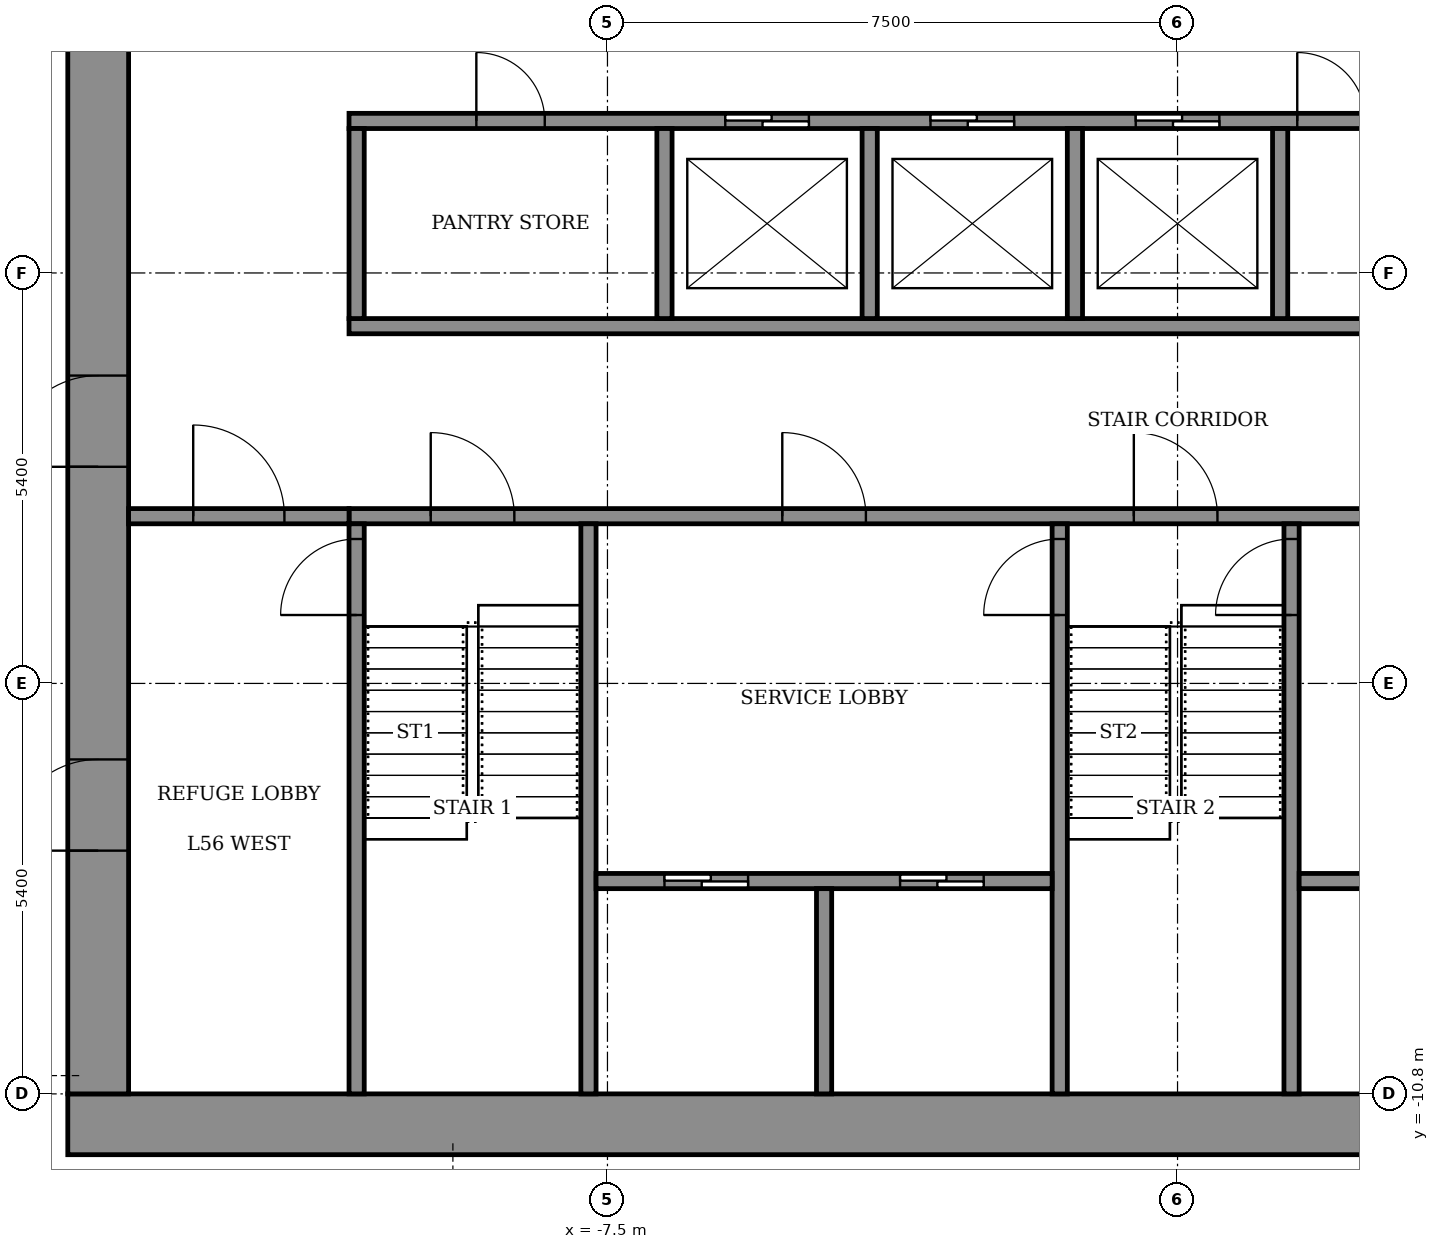
"""IFC4 building model, lengths in metres.
Left out: names, types, materials, properties, quantities, classifications, styles, units other than length and angle.
Written with IfcOpenShell. Run it as: python <this file> out.ifc"""

import sys

from ifc_helpers import new_model, si_unit, direction, frame, frame_2d, origin, place, context, subcontext, project, spatial, rectangle, extrude, element, fill, save


model = new_model("IFC4")
c1 = context("Model", 3, precision=1e-05, world=origin(), true_north=direction((0.0, 1.0)))
c2 = subcontext(c1, "Body", "Model", "MODEL_VIEW")
j1 = project(units=[si_unit("LENGTHUNIT", "METRE"), si_unit("PLANEANGLEUNIT", "RADIAN")], contexts=[c1])
p1 = place(None, origin())
s1 = spatial("IfcSite", under=j1, at=p1, CompositionType="ELEMENT")
p2 = place(p1, origin())
s2 = spatial("IfcBuilding", under=s1, at=p2, CompositionType="ELEMENT")
p3 = place(p2, frame((0.0, 0.0, 219.5)))
s3 = spatial("IfcBuildingStorey", under=s2, at=p3, CompositionType="ELEMENT", Elevation=219.5)
p4 = place(p3, frame((-14.6, -11.2, 0.0), z_axis=(0.0, 0.0, 1.0), x_axis=(1.0, 0.0, 0.0)))
e1 = element("IfcWall", 1, at=p4, inside=s3, PredefinedType="SHEAR", context=c2, shape_type="SweptSolid", body=[
    extrude(rectangle(XDim=29.2, YDim=0.8, at=frame_2d((14.6, 0.0))), origin(), (0.0, 0.0, 1.0), 7.0),
])
p5 = place(p3, frame((-14.2, -10.8, 0.0), z_axis=(0.0, 0.0, 1.0), x_axis=(0.0, 1.0, 0.0)))
e2 = element("IfcWall", 2, at=p5, inside=s3, PredefinedType="SHEAR", context=c2, shape_type="SweptSolid", body=[
    extrude(rectangle(XDim=21.6, YDim=0.8, at=frame_2d((10.8, 0.0))), origin(), (0.0, 0.0, 1.0), 7.0),
])
p6 = place(p5, frame((8.25, 0.0, 0.0)))
e3 = element("IfcOpeningElement", 3, at=p6, cuts=e2, PredefinedType="OPENING", context=c2, shape_type="SweptSolid", body=[
    extrude(rectangle(XDim=1.2, YDim=2.1, at=frame_2d((0.6, 1.05))), frame((0.0, 0.41, 0.0), z_axis=(0.0, -1.0, 0.0), x_axis=(1.0, 0.0, 0.0)), (0.0, 0.0, 1.0), 0.82),
])
p7 = place(p5, frame((15.25, 0.0, 0.0)))
e4 = element("IfcOpeningElement", 4, at=p7, cuts=e2, PredefinedType="OPENING", context=c2, shape_type="SweptSolid", body=[
    extrude(rectangle(XDim=1.2, YDim=2.1, at=frame_2d((0.6, 1.05))), frame((0.0, 0.41, 0.0), z_axis=(0.0, -1.0, 0.0), x_axis=(1.0, 0.0, 0.0)), (0.0, 0.0, 1.0), 0.82),
])
p8 = place(p5, frame((3.2, 0.0, 0.0)))
e5 = element("IfcOpeningElement", 5, at=p8, cuts=e2, PredefinedType="OPENING", context=c2, shape_type="SweptSolid", body=[
    extrude(rectangle(XDim=1.2, YDim=2.1, at=frame_2d((0.6, 1.05))), frame((0.0, 0.41, 0.0), z_axis=(0.0, -1.0, 0.0), x_axis=(1.0, 0.0, 0.0)), (0.0, 0.0, 1.0), 0.82),
])
p9 = place(p3, frame((-10.9, -3.2, 0.0), z_axis=(0.0, 0.0, 1.0), x_axis=(1.0, 0.0, 0.0)))
e6 = element("IfcWall", 6, at=p9, inside=s3, PredefinedType="SHEAR", context=c2, shape_type="SweptSolid", body=[
    extrude(rectangle(XDim=21.8, YDim=0.2, at=frame_2d((10.9, 0.0))), origin(), (0.0, 0.0, 1.0), 6.45),
])
p10 = place(p9, frame((1.075, 0.0, 0.0)))
e7 = element("IfcOpeningElement", 7, at=p10, cuts=e6, PredefinedType="OPENING", context=c2, shape_type="SweptSolid", body=[
    extrude(rectangle(XDim=1.1, YDim=2.1, at=frame_2d((0.55, 1.05))), frame((0.0, 0.11, 0.0), z_axis=(0.0, -1.0, 0.0), x_axis=(1.0, 0.0, 0.0)), (0.0, 0.0, 1.0), 0.22),
])
p11 = place(p9, frame((10.325, 0.0, 0.0)))
e8 = element("IfcOpeningElement", 8, at=p11, cuts=e6, PredefinedType="OPENING", context=c2, shape_type="SweptSolid", body=[
    extrude(rectangle(XDim=1.1, YDim=2.1, at=frame_2d((0.55, 1.05))), frame((0.0, 0.11, 0.0), z_axis=(0.0, -1.0, 0.0), x_axis=(1.0, 0.0, 0.0)), (0.0, 0.0, 1.0), 0.22),
])
p12 = place(p9, frame((19.625, 0.0, 0.0)))
e9 = element("IfcOpeningElement", 9, at=p12, cuts=e6, PredefinedType="OPENING", context=c2, shape_type="SweptSolid", body=[
    extrude(rectangle(XDim=1.1, YDim=2.1, at=frame_2d((0.55, 1.05))), frame((0.0, 0.11, 0.0), z_axis=(0.0, -1.0, 0.0), x_axis=(1.0, 0.0, 0.0)), (0.0, 0.0, 1.0), 0.22),
])
p13 = place(p9, frame((5.7, 0.0, 0.0)))
e10 = element("IfcOpeningElement", 10, at=p13, cuts=e6, PredefinedType="OPENING", context=c2, shape_type="SweptSolid", body=[
    extrude(rectangle(XDim=1.1, YDim=2.1, at=frame_2d((0.55, 1.05))), frame((0.0, 0.11, 0.0), z_axis=(0.0, -1.0, 0.0), x_axis=(1.0, 0.0, 0.0)), (0.0, 0.0, 1.0), 0.22),
])
p14 = place(p9, frame((14.975, 0.0, 0.0)))
e11 = element("IfcOpeningElement", 11, at=p14, cuts=e6, PredefinedType="OPENING", context=c2, shape_type="SweptSolid", body=[
    extrude(rectangle(XDim=1.1, YDim=2.1, at=frame_2d((0.55, 1.05))), frame((0.0, 0.11, 0.0), z_axis=(0.0, -1.0, 0.0), x_axis=(1.0, 0.0, 0.0)), (0.0, 0.0, 1.0), 0.22),
])
p15 = place(p3, frame((-10.9, -0.7, 0.0), z_axis=(0.0, 0.0, 1.0), x_axis=(1.0, 0.0, 0.0)))
e12 = element("IfcWall", 12, at=p15, inside=s3, PredefinedType="SHEAR", context=c2, shape_type="SweptSolid", body=[
    extrude(rectangle(XDim=21.8, YDim=0.2, at=frame_2d((10.9, 0.0))), origin(), (0.0, 0.0, 1.0), 6.45),
])
p16 = place(p3, frame((-10.9, 2.0, 0.0), z_axis=(0.0, 0.0, 1.0), x_axis=(1.0, 0.0, 0.0)))
e13 = element("IfcWall", 13, at=p16, inside=s3, PredefinedType="SHEAR", context=c2, shape_type="SweptSolid", body=[
    extrude(rectangle(XDim=21.8, YDim=0.2, at=frame_2d((10.9, 0.0))), origin(), (0.0, 0.0, 1.0), 6.45),
])
p17 = place(p16, frame((4.95, 0.0, 0.0)))
e14 = element("IfcOpeningElement", 14, at=p17, cuts=e13, PredefinedType="OPENING", context=c2, shape_type="SweptSolid", body=[
    extrude(rectangle(XDim=1.1, YDim=2.1, at=frame_2d((0.55, 1.05))), frame((0.0, 0.11, 0.0), z_axis=(0.0, -1.0, 0.0), x_axis=(1.0, 0.0, 0.0)), (0.0, 0.0, 1.0), 0.22),
])
p18 = place(p16, frame((7.65, 0.0, 0.0)))
e15 = element("IfcOpeningElement", 15, at=p18, cuts=e13, PredefinedType="OPENING", context=c2, shape_type="SweptSolid", body=[
    extrude(rectangle(XDim=1.1, YDim=2.1, at=frame_2d((0.55, 1.05))), frame((0.0, 0.11, 0.0), z_axis=(0.0, -1.0, 0.0), x_axis=(1.0, 0.0, 0.0)), (0.0, 0.0, 1.0), 0.22),
])
p19 = place(p16, frame((10.35, 0.0, 0.0)))
e16 = element("IfcOpeningElement", 16, at=p19, cuts=e13, PredefinedType="OPENING", context=c2, shape_type="SweptSolid", body=[
    extrude(rectangle(XDim=1.1, YDim=2.1, at=frame_2d((0.55, 1.05))), frame((0.0, 0.11, 0.0), z_axis=(0.0, -1.0, 0.0), x_axis=(1.0, 0.0, 0.0)), (0.0, 0.0, 1.0), 0.22),
])
p20 = place(p16, frame((14.4, 0.0, 0.0)))
e17 = element("IfcOpeningElement", 17, at=p20, cuts=e13, PredefinedType="OPENING", context=c2, shape_type="SweptSolid", body=[
    extrude(rectangle(XDim=1.1, YDim=2.1, at=frame_2d((0.55, 1.05))), frame((0.0, 0.11, 0.0), z_axis=(0.0, -1.0, 0.0), x_axis=(1.0, 0.0, 0.0)), (0.0, 0.0, 1.0), 0.22),
])
p21 = place(p16, frame((17.1, 0.0, 0.0)))
e18 = element("IfcOpeningElement", 18, at=p21, cuts=e13, PredefinedType="OPENING", context=c2, shape_type="SweptSolid", body=[
    extrude(rectangle(XDim=1.1, YDim=2.1, at=frame_2d((0.55, 1.05))), frame((0.0, 0.11, 0.0), z_axis=(0.0, -1.0, 0.0), x_axis=(1.0, 0.0, 0.0)), (0.0, 0.0, 1.0), 0.22),
])
p22 = place(p16, frame((19.8, 0.0, 0.0)))
e19 = element("IfcOpeningElement", 19, at=p22, cuts=e13, PredefinedType="OPENING", context=c2, shape_type="SweptSolid", body=[
    extrude(rectangle(XDim=1.1, YDim=2.1, at=frame_2d((0.55, 1.05))), frame((0.0, 0.11, 0.0), z_axis=(0.0, -1.0, 0.0), x_axis=(1.0, 0.0, 0.0)), (0.0, 0.0, 1.0), 0.22),
])
p23 = place(p16, frame((1.675, 0.0, 0.0)))
e20 = element("IfcOpeningElement", 20, at=p23, cuts=e13, PredefinedType="OPENING", context=c2, shape_type="SweptSolid", body=[
    extrude(rectangle(XDim=0.9, YDim=2.1, at=frame_2d((0.45, 1.05))), frame((0.0, 0.11, 0.0), z_axis=(0.0, -1.0, 0.0), x_axis=(1.0, 0.0, 0.0)), (0.0, 0.0, 1.0), 0.22),
])
p24 = place(p16, frame((12.475, 0.0, 0.0)))
e21 = element("IfcOpeningElement", 21, at=p24, cuts=e13, PredefinedType="OPENING", context=c2, shape_type="SweptSolid", body=[
    extrude(rectangle(XDim=0.9, YDim=2.1, at=frame_2d((0.45, 1.05))), frame((0.0, 0.11, 0.0), z_axis=(0.0, -1.0, 0.0), x_axis=(1.0, 0.0, 0.0)), (0.0, 0.0, 1.0), 0.22),
])
p25 = place(p3, frame((-10.8, -10.8, 0.0), z_axis=(0.0, 0.0, 1.0), x_axis=(0.0, 1.0, 0.0)))
e22 = element("IfcWall", 22, at=p25, inside=s3, PredefinedType="SHEAR", context=c2, shape_type="SweptSolid", body=[
    extrude(rectangle(XDim=7.5, YDim=0.2, at=frame_2d((3.75, 0.0))), origin(), (0.0, 0.0, 1.0), 6.45),
])
p26 = place(p25, frame((6.3, 0.0, 0.0)))
e23 = element("IfcOpeningElement", 23, at=p26, cuts=e22, PredefinedType="OPENING", context=c2, shape_type="SweptSolid", body=[
    extrude(rectangle(XDim=1.0, YDim=2.1, at=frame_2d((0.5, 1.05))), frame((0.0, 0.11, 0.0), z_axis=(0.0, -1.0, 0.0), x_axis=(1.0, 0.0, 0.0)), (0.0, 0.0, 1.0), 0.22),
])
p27 = place(p3, frame((-7.75, -10.8, 0.0), z_axis=(0.0, 0.0, 1.0), x_axis=(0.0, 1.0, 0.0)))
e24 = element("IfcWall", 24, at=p27, inside=s3, PredefinedType="SHEAR", context=c2, shape_type="SweptSolid", body=[
    extrude(rectangle(XDim=7.5, YDim=0.2, at=frame_2d((3.75, 0.0))), origin(), (0.0, 0.0, 1.0), 6.45),
])
p28 = place(p3, frame((-1.55, -10.8, 0.0), z_axis=(0.0, 0.0, 1.0), x_axis=(0.0, 1.0, 0.0)))
e25 = element("IfcWall", 25, at=p28, inside=s3, PredefinedType="SHEAR", context=c2, shape_type="SweptSolid", body=[
    extrude(rectangle(XDim=7.5, YDim=0.2, at=frame_2d((3.75, 0.0))), origin(), (0.0, 0.0, 1.0), 6.45),
])
p29 = place(p28, frame((6.3, 0.0, 0.0)))
e26 = element("IfcOpeningElement", 26, at=p29, cuts=e25, PredefinedType="OPENING", context=c2, shape_type="SweptSolid", body=[
    extrude(rectangle(XDim=1.0, YDim=2.1, at=frame_2d((0.5, 1.05))), frame((0.0, 0.11, 0.0), z_axis=(0.0, -1.0, 0.0), x_axis=(1.0, 0.0, 0.0)), (0.0, 0.0, 1.0), 0.22),
])
p30 = place(p3, frame((1.5, -10.8, 0.0), z_axis=(0.0, 0.0, 1.0), x_axis=(0.0, 1.0, 0.0)))
e27 = element("IfcWall", 27, at=p30, inside=s3, PredefinedType="SHEAR", context=c2, shape_type="SweptSolid", body=[
    extrude(rectangle(XDim=7.5, YDim=0.2, at=frame_2d((3.75, 0.0))), origin(), (0.0, 0.0, 1.0), 6.45),
])
p31 = place(p30, frame((6.3, 0.0, 0.0)))
e28 = element("IfcOpeningElement", 28, at=p31, cuts=e27, PredefinedType="OPENING", context=c2, shape_type="SweptSolid", body=[
    extrude(rectangle(XDim=1.0, YDim=2.1, at=frame_2d((0.5, 1.05))), frame((0.0, 0.11, 0.0), z_axis=(0.0, -1.0, 0.0), x_axis=(1.0, 0.0, 0.0)), (0.0, 0.0, 1.0), 0.22),
])
p32 = place(p3, frame((-7.65, -8.0, 0.0), z_axis=(0.0, 0.0, 1.0), x_axis=(1.0, 0.0, 0.0)))
e29 = element("IfcWall", 29, at=p32, inside=s3, PredefinedType="SHEAR", context=c2, shape_type="SweptSolid", body=[
    extrude(rectangle(XDim=6.0, YDim=0.2, at=frame_2d((3.0, 0.0))), origin(), (0.0, 0.0, 1.0), 6.45),
])
p33 = place(p32, frame((0.9, 0.0, 0.0)))
e30 = element("IfcOpeningElement", 30, at=p33, cuts=e29, PredefinedType="OPENING", context=c2, shape_type="SweptSolid", body=[
    extrude(rectangle(XDim=1.1, YDim=2.1, at=frame_2d((0.55, 1.05))), frame((0.0, 0.11, 0.0), z_axis=(0.0, -1.0, 0.0), x_axis=(1.0, 0.0, 0.0)), (0.0, 0.0, 1.0), 0.22),
])
p34 = place(p32, frame((4.0, 0.0, 0.0)))
e31 = element("IfcOpeningElement", 31, at=p34, cuts=e29, PredefinedType="OPENING", context=c2, shape_type="SweptSolid", body=[
    extrude(rectangle(XDim=1.1, YDim=2.1, at=frame_2d((0.55, 1.05))), frame((0.0, 0.11, 0.0), z_axis=(0.0, -1.0, 0.0), x_axis=(1.0, 0.0, 0.0)), (0.0, 0.0, 1.0), 0.22),
])
p35 = place(p3, frame((-4.65, -10.8, 0.0), z_axis=(0.0, 0.0, 1.0), x_axis=(0.0, 1.0, 0.0)))
e32 = element("IfcWall", 32, at=p35, inside=s3, PredefinedType="SHEAR", context=c2, shape_type="SweptSolid", body=[
    extrude(rectangle(XDim=2.7, YDim=0.2, at=frame_2d((1.35, 0.0))), origin(), (0.0, 0.0, 1.0), 6.45),
])
p36 = place(p3, frame((1.6, -8.0, 0.0), z_axis=(0.0, 0.0, 1.0), x_axis=(1.0, 0.0, 0.0)))
e33 = element("IfcWall", 33, at=p36, inside=s3, PredefinedType="SHEAR", context=c2, shape_type="SweptSolid", body=[
    extrude(rectangle(XDim=6.05, YDim=0.2, at=frame_2d((3.025, 0.0))), origin(), (0.0, 0.0, 1.0), 6.45),
])
p37 = place(p36, frame((0.913, 0.0, 0.0)))
e34 = element("IfcOpeningElement", 34, at=p37, cuts=e33, PredefinedType="OPENING", context=c2, shape_type="SweptSolid", body=[
    extrude(rectangle(XDim=1.1, YDim=2.1, at=frame_2d((0.55, 1.05))), frame((0.0, 0.11, 0.0), z_axis=(0.0, -1.0, 0.0), x_axis=(1.0, 0.0, 0.0)), (0.0, 0.0, 1.0), 0.22),
])
p38 = place(p36, frame((4.038, 0.0, 0.0)))
e35 = element("IfcOpeningElement", 35, at=p38, cuts=e33, PredefinedType="OPENING", context=c2, shape_type="SweptSolid", body=[
    extrude(rectangle(XDim=1.1, YDim=2.1, at=frame_2d((0.55, 1.05))), frame((0.0, 0.11, 0.0), z_axis=(0.0, -1.0, 0.0), x_axis=(1.0, 0.0, 0.0)), (0.0, 0.0, 1.0), 0.22),
])
p39 = place(p3, frame((-10.8, -0.6, 0.0), z_axis=(0.0, 0.0, 1.0), x_axis=(0.0, 1.0, 0.0)))
e36 = element("IfcWall", 36, at=p39, inside=s3, PredefinedType="STANDARD", context=c2, shape_type="SweptSolid", body=[
    extrude(rectangle(XDim=2.5, YDim=0.2, at=frame_2d((1.25, 0.0))), origin(), (0.0, 0.0, 1.0), 6.45),
])
for number, where, z_axis, x_axis in (
    (37, (-6.75, -0.6, 0.0), (0.0, 0.0, 1.0), (0.0, 1.0, 0.0)),
    (38, (-4.05, -0.6, 0.0), (0.0, 0.0, 1.0), (0.0, 1.0, 0.0)),
    (39, (-1.35, -0.6, 0.0), (0.0, 0.0, 1.0), (0.0, 1.0, 0.0)),
    (40, (1.35, -0.6, 0.0), (0.0, 0.0, 1.0), (0.0, 1.0, 0.0)),
):
    element("IfcWall", number, at=place(p3, frame(where, z_axis=z_axis, x_axis=x_axis)), inside=s3, PredefinedType="SHEAR", context=c2, shape_type="SweptSolid", body=[
        extrude(rectangle(XDim=2.5, YDim=0.2, at=frame_2d((1.25, 0.0))), origin(), (0.0, 0.0, 1.0), 6.45),
    ])
p40 = place(p3, frame((-13.8, -3.2, 0.0), z_axis=(0.0, 0.0, 1.0), x_axis=(1.0, 0.0, 0.0)))
e41 = element("IfcWall", 41, at=p40, inside=s3, PredefinedType="STANDARD", context=c2, shape_type="SweptSolid", body=[
    extrude(rectangle(XDim=2.9, YDim=0.2, at=frame_2d((1.45, 0.0))), origin(), (0.0, 0.0, 1.0), 6.45),
])
p41 = place(p40, frame((0.85, 0.0, 0.0)))
e42 = element("IfcOpeningElement", 42, at=p41, cuts=e41, PredefinedType="OPENING", context=c2, shape_type="SweptSolid", body=[
    extrude(rectangle(XDim=1.2, YDim=2.1, at=frame_2d((0.6, 1.05))), frame((0.0, 0.11, 0.0), z_axis=(0.0, -1.0, 0.0), x_axis=(1.0, 0.0, 0.0)), (0.0, 0.0, 1.0), 0.22),
])
p42 = place(p6, origin())
e43 = element("IfcDoor", 43, at=p42, inside=s3, OperationType="DOUBLE_DOOR_SINGLE_SWING", PredefinedType="DOOR", context=c2, shape_type="SweptSolid", body=[
    extrude(rectangle(XDim=1.2, YDim=2.1, at=frame_2d((0.6, 1.05))), frame((0.0, 0.025, 0.0), z_axis=(0.0, -1.0, 0.0), x_axis=(1.0, 0.0, 0.0)), (0.0, 0.0, 1.0), 0.05),
])
fill(e3, e43)
p43 = place(p8, origin())
e44 = element("IfcDoor", 44, at=p43, inside=s3, OperationType="DOUBLE_DOOR_SINGLE_SWING", PredefinedType="DOOR", context=c2, shape_type="SweptSolid", body=[
    extrude(rectangle(XDim=1.2, YDim=2.1, at=frame_2d((0.6, 1.05))), frame((0.0, 0.025, 0.0), z_axis=(0.0, -1.0, 0.0), x_axis=(1.0, 0.0, 0.0)), (0.0, 0.0, 1.0), 0.05),
])
fill(e5, e44)
p44 = place(p17, origin())
e45 = element("IfcDoor", 45, at=p44, inside=s3, OperationType="SLIDING_TO_LEFT", PredefinedType="DOOR", context=c2, shape_type="SweptSolid", body=[
    extrude(rectangle(XDim=1.1, YDim=2.1, at=frame_2d((0.55, 1.05))), frame((0.0, 0.025, 0.0), z_axis=(0.0, -1.0, 0.0), x_axis=(1.0, 0.0, 0.0)), (0.0, 0.0, 1.0), 0.05),
])
fill(e14, e45)
p45 = place(p18, origin())
e46 = element("IfcDoor", 46, at=p45, inside=s3, OperationType="SLIDING_TO_LEFT", PredefinedType="DOOR", context=c2, shape_type="SweptSolid", body=[
    extrude(rectangle(XDim=1.1, YDim=2.1, at=frame_2d((0.55, 1.05))), frame((0.0, 0.025, 0.0), z_axis=(0.0, -1.0, 0.0), x_axis=(1.0, 0.0, 0.0)), (0.0, 0.0, 1.0), 0.05),
])
fill(e15, e46)
p46 = place(p19, origin())
e47 = element("IfcDoor", 47, at=p46, inside=s3, OperationType="SLIDING_TO_LEFT", PredefinedType="DOOR", context=c2, shape_type="SweptSolid", body=[
    extrude(rectangle(XDim=1.1, YDim=2.1, at=frame_2d((0.55, 1.05))), frame((0.0, 0.025, 0.0), z_axis=(0.0, -1.0, 0.0), x_axis=(1.0, 0.0, 0.0)), (0.0, 0.0, 1.0), 0.05),
])
fill(e16, e47)
p47 = place(p23, origin())
e48 = element("IfcDoor", 48, at=p47, inside=s3, OperationType="SINGLE_SWING_RIGHT", PredefinedType="DOOR", context=c2, shape_type="SweptSolid", body=[
    extrude(rectangle(XDim=0.9, YDim=2.1, at=frame_2d((0.45, 1.05))), frame((0.0, 0.025, 0.0), z_axis=(0.0, -1.0, 0.0), x_axis=(1.0, 0.0, 0.0)), (0.0, 0.0, 1.0), 0.05),
])
fill(e20, e48)
p48 = place(p24, origin())
e49 = element("IfcDoor", 49, at=p48, inside=s3, OperationType="SINGLE_SWING_RIGHT", PredefinedType="DOOR", context=c2, shape_type="SweptSolid", body=[
    extrude(rectangle(XDim=0.9, YDim=2.1, at=frame_2d((0.45, 1.05))), frame((0.0, 0.025, 0.0), z_axis=(0.0, -1.0, 0.0), x_axis=(1.0, 0.0, 0.0)), (0.0, 0.0, 1.0), 0.05),
])
fill(e21, e49)
p49 = place(p33, origin())
e50 = element("IfcDoor", 50, at=p49, inside=s3, OperationType="SLIDING_TO_LEFT", PredefinedType="DOOR", context=c2, shape_type="SweptSolid", body=[
    extrude(rectangle(XDim=1.1, YDim=2.1, at=frame_2d((0.55, 1.05))), frame((0.0, 0.025, 0.0), z_axis=(0.0, -1.0, 0.0), x_axis=(1.0, 0.0, 0.0)), (0.0, 0.0, 1.0), 0.05),
])
fill(e30, e50)
p50 = place(p34, origin())
e51 = element("IfcDoor", 51, at=p50, inside=s3, OperationType="SLIDING_TO_LEFT", PredefinedType="DOOR", context=c2, shape_type="SweptSolid", body=[
    extrude(rectangle(XDim=1.1, YDim=2.1, at=frame_2d((0.55, 1.05))), frame((0.0, 0.025, 0.0), z_axis=(0.0, -1.0, 0.0), x_axis=(1.0, 0.0, 0.0)), (0.0, 0.0, 1.0), 0.05),
])
fill(e31, e51)
p51 = place(p10, origin())
e52 = element("IfcDoor", 52, at=p51, inside=s3, OperationType="SINGLE_SWING_RIGHT", PredefinedType="DOOR", context=c2, shape_type="SweptSolid", body=[
    extrude(rectangle(XDim=1.1, YDim=2.1, at=frame_2d((0.55, 1.05))), frame((0.0, 0.025, 0.0), z_axis=(0.0, -1.0, 0.0), x_axis=(1.0, 0.0, 0.0)), (0.0, 0.0, 1.0), 0.05),
])
fill(e7, e52)
p52 = place(p11, origin())
e53 = element("IfcDoor", 53, at=p52, inside=s3, OperationType="SINGLE_SWING_RIGHT", PredefinedType="DOOR", context=c2, shape_type="SweptSolid", body=[
    extrude(rectangle(XDim=1.1, YDim=2.1, at=frame_2d((0.55, 1.05))), frame((0.0, 0.025, 0.0), z_axis=(0.0, -1.0, 0.0), x_axis=(1.0, 0.0, 0.0)), (0.0, 0.0, 1.0), 0.05),
])
fill(e8, e53)
p53 = place(p13, origin())
e54 = element("IfcDoor", 54, at=p53, inside=s3, OperationType="SINGLE_SWING_LEFT", PredefinedType="DOOR", context=c2, shape_type="SweptSolid", body=[
    extrude(rectangle(XDim=1.1, YDim=2.1, at=frame_2d((0.55, 1.05))), frame((0.0, 0.025, 0.0), z_axis=(0.0, -1.0, 0.0), x_axis=(1.0, 0.0, 0.0)), (0.0, 0.0, 1.0), 0.05),
])
fill(e10, e54)
p54 = place(p29, origin())
e55 = element("IfcDoor", 55, at=p54, inside=s3, OperationType="SINGLE_SWING_RIGHT", PredefinedType="DOOR", context=c2, shape_type="SweptSolid", body=[
    extrude(rectangle(XDim=1.0, YDim=2.1, at=frame_2d((0.5, 1.05))), frame((0.0, 0.025, 0.0), z_axis=(0.0, -1.0, 0.0), x_axis=(1.0, 0.0, 0.0)), (0.0, 0.0, 1.0), 0.05),
])
fill(e26, e55)
p55 = place(p31, origin())
e56 = element("IfcDoor", 56, at=p55, inside=s3, OperationType="SINGLE_SWING_RIGHT", PredefinedType="DOOR", context=c2, shape_type="SweptSolid", body=[
    extrude(rectangle(XDim=1.0, YDim=2.1, at=frame_2d((0.5, 1.05))), frame((0.0, 0.025, 0.0), z_axis=(0.0, -1.0, 0.0), x_axis=(1.0, 0.0, 0.0)), (0.0, 0.0, 1.0), 0.05),
])
fill(e28, e56)
p56 = place(p41, origin())
e57 = element("IfcDoor", 57, at=p56, inside=s3, OperationType="SINGLE_SWING_LEFT", PredefinedType="DOOR", context=c2, shape_type="SweptSolid", body=[
    extrude(rectangle(XDim=1.2, YDim=2.1, at=frame_2d((0.6, 1.05))), frame((0.0, 0.025, 0.0), z_axis=(0.0, -1.0, 0.0), x_axis=(1.0, 0.0, 0.0)), (0.0, 0.0, 1.0), 0.05),
])
fill(e42, e57)
p57 = place(p26, origin())
e58 = element("IfcDoor", 58, at=p57, inside=s3, OperationType="SINGLE_SWING_RIGHT", PredefinedType="DOOR", context=c2, shape_type="SweptSolid", body=[
    extrude(rectangle(XDim=1.0, YDim=2.1, at=frame_2d((0.5, 1.05))), frame((0.0, 0.025, 0.0), z_axis=(0.0, -1.0, 0.0), x_axis=(1.0, 0.0, 0.0)), (0.0, 0.0, 1.0), 0.05),
])
fill(e23, e58)
save(model, sys.argv[1])
